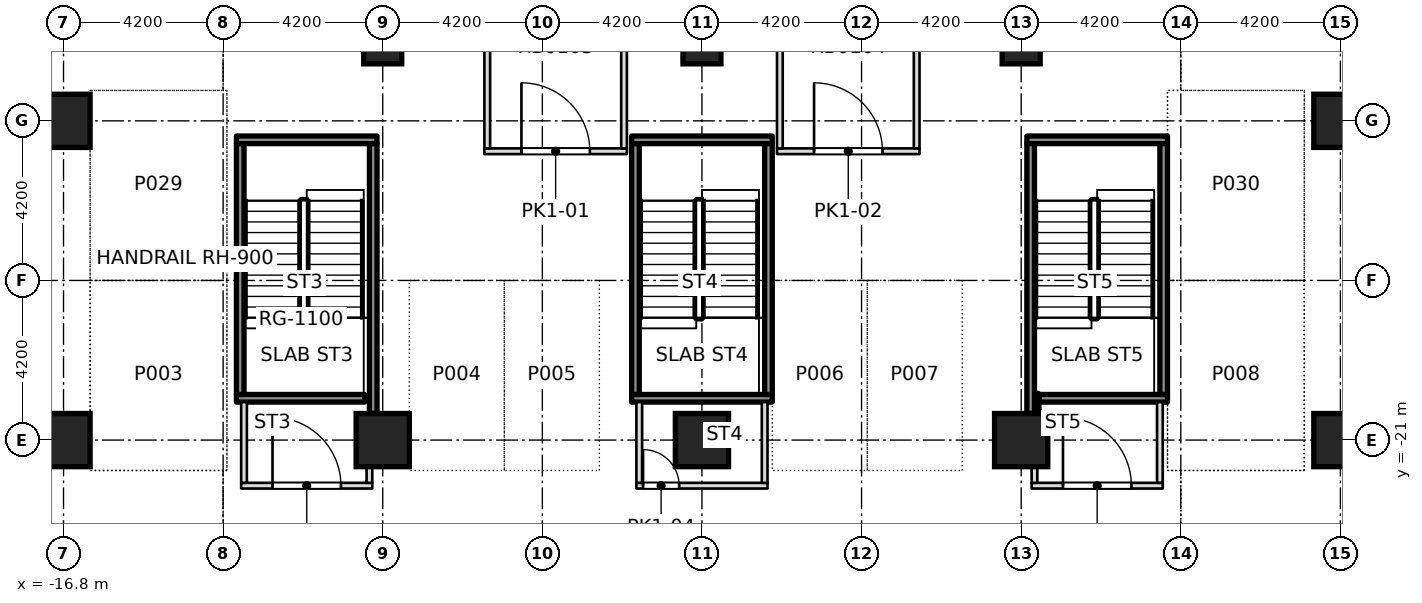
"""IFC4 building model, lengths in metres.
Left out: names, types, materials, properties, quantities, classifications, styles, units other than length and angle.
Written with IfcOpenShell. Run it as: python <this file> out.ifc"""

import sys

from ifc_helpers import new_model, si_unit, direction, frame, frame_2d, origin, origin_2d, place, context, subcontext, project, spatial, rectangle, extrude, element, fill, save


model = new_model("IFC4")
c1 = context("Model", 3, precision=1e-05, world=origin(), true_north=direction((0.0, 1.0)))
c2 = subcontext(c1, "Body", "Model", "MODEL_VIEW")
j1 = project(units=[si_unit("LENGTHUNIT", "METRE"), si_unit("PLANEANGLEUNIT", "RADIAN")], contexts=[c1])
p1 = place(None, origin())
s1 = spatial("IfcSite", under=j1, at=p1, CompositionType="ELEMENT")
p2 = place(p1, origin())
s2 = spatial("IfcBuilding", under=s1, at=p2, CompositionType="ELEMENT")
p3 = place(p2, frame((0.0, 0.0, -4.2)))
s3 = spatial("IfcBuildingStorey", under=s2, at=p3, CompositionType="ELEMENT", Elevation=-4.2)
for number, where, z_axis, x_axis in (
    (1, (-16.8, -21.0, -0.35), (0.0, 0.0, 1.0), (1.0, 0.0, 0.0)),
    (2, (-8.4, -21.0, -0.35), (0.0, 0.0, 1.0), (1.0, 0.0, 0.0)),
    (3, (0.0, -21.0, -0.35), (0.0, 0.0, 1.0), (1.0, 0.0, 0.0)),
    (4, (8.4, -21.0, -0.35), (0.0, 0.0, 1.0), (1.0, 0.0, 0.0)),
    (5, (16.8, -21.0, -0.35), (0.0, 0.0, 1.0), (1.0, 0.0, 0.0)),
    (6, (-16.8, -12.6, -0.35), (0.0, 0.0, 1.0), (1.0, 0.0, 0.0)),
    (7, (16.8, -12.6, -0.35), (0.0, 0.0, 1.0), (1.0, 0.0, 0.0)),
):
    element("IfcColumn", number, at=place(p3, frame(where, z_axis=z_axis, x_axis=x_axis)), inside=s3, PredefinedType="COLUMN", context=c2, shape_type="SweptSolid", body=[
        extrude(rectangle(XDim=1.4, YDim=1.4, at=origin_2d()), origin(), (0.0, 0.0, 1.0), 4.1),
    ])
for number, where, z_axis, x_axis in (
    (8, (-8.4, -10.6, -0.35), (0.0, 0.0, 1.0), (1.0, 0.0, 0.0)),
    (9, (0.0, -10.6, -0.35), (0.0, 0.0, 1.0), (1.0, 0.0, 0.0)),
    (10, (8.4, -10.6, -0.35), (0.0, 0.0, 1.0), (1.0, 0.0, 0.0)),
):
    element("IfcColumn", number, at=place(p3, frame(where, z_axis=z_axis, x_axis=x_axis)), inside=s3, PredefinedType="COLUMN", context=c2, shape_type="SweptSolid", body=[
        extrude(rectangle(XDim=1.0, YDim=1.0, at=origin_2d()), origin(), (0.0, 0.0, 1.0), 4.1),
    ])
p4 = place(p3, frame((-12.125, -22.2, 0.0), z_axis=(0.0, 0.0, 1.0), x_axis=(1.0, 0.0, 0.0)))
e11 = element("IfcWall", 11, at=p4, inside=s3, PredefinedType="PARTITIONING", context=c2, shape_type="SweptSolid", body=[
    extrude(rectangle(XDim=3.45, YDim=0.15, at=frame_2d((1.725, 0.0))), origin(), (0.0, 0.0, 1.0), 3.75),
])
p5 = place(p4, frame((0.825, 0.0, 0.0)))
e12 = element("IfcOpeningElement", 12, at=p5, cuts=e11, PredefinedType="OPENING", context=c2, shape_type="SweptSolid", body=[
    extrude(rectangle(XDim=1.8, YDim=2.1, at=frame_2d((0.9, 1.05))), frame((0.0, 0.085, 0.0), z_axis=(0.0, -1.0, 0.0), x_axis=(1.0, 0.0, 0.0)), (0.0, 0.0, 1.0), 0.17),
])
p6 = place(p3, frame((-1.725, -22.2, 0.0), z_axis=(0.0, 0.0, 1.0), x_axis=(1.0, 0.0, 0.0)))
e13 = element("IfcWall", 13, at=p6, inside=s3, PredefinedType="PARTITIONING", context=c2, shape_type="SweptSolid", body=[
    extrude(rectangle(XDim=3.45, YDim=0.15, at=frame_2d((1.725, 0.0))), origin(), (0.0, 0.0, 1.0), 3.75),
])
p7 = place(p6, frame((0.175, 0.0, 0.0)))
e14 = element("IfcOpeningElement", 14, at=p7, cuts=e13, PredefinedType="OPENING", context=c2, shape_type="SweptSolid", body=[
    extrude(rectangle(XDim=0.95, YDim=2.1, at=frame_2d((0.475, 1.05))), frame((0.0, 0.085, 0.0), z_axis=(0.0, -1.0, 0.0), x_axis=(1.0, 0.0, 0.0)), (0.0, 0.0, 1.0), 0.17),
])
p8 = place(p3, frame((8.675, -22.2, 0.0), z_axis=(0.0, 0.0, 1.0), x_axis=(1.0, 0.0, 0.0)))
e15 = element("IfcWall", 15, at=p8, inside=s3, PredefinedType="PARTITIONING", context=c2, shape_type="SweptSolid", body=[
    extrude(rectangle(XDim=3.45, YDim=0.15, at=frame_2d((1.725, 0.0))), origin(), (0.0, 0.0, 1.0), 3.75),
])
p9 = place(p8, frame((0.825, 0.0, 0.0)))
e16 = element("IfcOpeningElement", 16, at=p9, cuts=e15, PredefinedType="OPENING", context=c2, shape_type="SweptSolid", body=[
    extrude(rectangle(XDim=1.8, YDim=2.1, at=frame_2d((0.9, 1.05))), frame((0.0, 0.085, 0.0), z_axis=(0.0, -1.0, 0.0), x_axis=(1.0, 0.0, 0.0)), (0.0, 0.0, 1.0), 0.17),
])
p10 = place(p3, frame((-5.725, -13.4, 0.0), z_axis=(0.0, 0.0, 1.0), x_axis=(1.0, 0.0, 0.0)))
e17 = element("IfcWall", 17, at=p10, inside=s3, PredefinedType="PARTITIONING", context=c2, shape_type="SweptSolid", body=[
    extrude(rectangle(XDim=3.75, YDim=0.15, at=frame_2d((1.875, 0.0))), origin(), (0.0, 0.0, 1.0), 3.75),
])
p11 = place(p10, frame((0.975, 0.0, 0.0)))
e18 = element("IfcOpeningElement", 18, at=p11, cuts=e17, PredefinedType="OPENING", context=c2, shape_type="SweptSolid", body=[
    extrude(rectangle(XDim=1.8, YDim=2.1, at=frame_2d((0.9, 1.05))), frame((0.0, 0.085, 0.0), z_axis=(0.0, -1.0, 0.0), x_axis=(1.0, 0.0, 0.0)), (0.0, 0.0, 1.0), 0.17),
])
p12 = place(p3, frame((1.975, -13.4, 0.0), z_axis=(0.0, 0.0, 1.0), x_axis=(1.0, 0.0, 0.0)))
e19 = element("IfcWall", 19, at=p12, inside=s3, PredefinedType="PARTITIONING", context=c2, shape_type="SweptSolid", body=[
    extrude(rectangle(XDim=3.75, YDim=0.15, at=frame_2d((1.875, 0.0))), origin(), (0.0, 0.0, 1.0), 3.75),
])
p13 = place(p12, frame((0.975, 0.0, 0.0)))
e20 = element("IfcOpeningElement", 20, at=p13, cuts=e19, PredefinedType="OPENING", context=c2, shape_type="SweptSolid", body=[
    extrude(rectangle(XDim=1.8, YDim=2.1, at=frame_2d((0.9, 1.05))), frame((0.0, 0.085, 0.0), z_axis=(0.0, -1.0, 0.0), x_axis=(1.0, 0.0, 0.0)), (0.0, 0.0, 1.0), 0.17),
])
p14 = place(p3, frame((-12.05, -22.125, 0.0), z_axis=(0.0, 0.0, 1.0), x_axis=(0.0, 1.0, 0.0)))
e21 = element("IfcWall", 21, at=p14, inside=s3, PredefinedType="PARTITIONING", context=c2, shape_type="SweptSolid", body=[
    extrude(rectangle(XDim=2.125, YDim=0.15, at=frame_2d((1.062, 0.0))), origin(), (0.0, 0.0, 1.0), 3.75),
])
p15 = place(p3, frame((-8.75, -22.125, 0.0), z_axis=(0.0, 0.0, 1.0), x_axis=(0.0, 1.0, 0.0)))
e22 = element("IfcWall", 22, at=p15, inside=s3, PredefinedType="PARTITIONING", context=c2, shape_type="SweptSolid", body=[
    extrude(rectangle(XDim=0.425, YDim=0.15, at=frame_2d((0.212, 0.0))), origin(), (0.0, 0.0, 1.0), 3.75),
])
for number, where, z_axis, x_axis in (
    (23, (-5.65, -13.325, 0.0), (0.0, 0.0, 1.0), (0.0, 1.0, 0.0)),
    (24, (-2.05, -13.325, 0.0), (0.0, 0.0, 1.0), (0.0, 1.0, 0.0)),
):
    element("IfcWall", number, at=place(p3, frame(where, z_axis=z_axis, x_axis=x_axis)), inside=s3, PredefinedType="PARTITIONING", context=c2, shape_type="SweptSolid", body=[
        extrude(rectangle(XDim=4.924, YDim=0.15, at=frame_2d((2.462, 0.0))), origin(), (0.0, 0.0, 1.0), 3.75),
    ])
for number, where, z_axis, x_axis in (
    (25, (-1.65, -22.125, 0.0), (0.0, 0.0, 1.0), (0.0, 1.0, 0.0)),
    (26, (1.65, -22.125, 0.0), (0.0, 0.0, 1.0), (0.0, 1.0, 0.0)),
):
    element("IfcWall", number, at=place(p3, frame(where, z_axis=z_axis, x_axis=x_axis)), inside=s3, PredefinedType="PARTITIONING", context=c2, shape_type="SweptSolid", body=[
        extrude(rectangle(XDim=2.125, YDim=0.15, at=frame_2d((1.062, 0.0))), origin(), (0.0, 0.0, 1.0), 3.75),
    ])
for number, where, z_axis, x_axis in (
    (27, (2.05, -13.325, 0.0), (0.0, 0.0, 1.0), (0.0, 1.0, 0.0)),
    (28, (5.65, -13.325, 0.0), (0.0, 0.0, 1.0), (0.0, 1.0, 0.0)),
):
    element("IfcWall", number, at=place(p3, frame(where, z_axis=z_axis, x_axis=x_axis)), inside=s3, PredefinedType="PARTITIONING", context=c2, shape_type="SweptSolid", body=[
        extrude(rectangle(XDim=4.924, YDim=0.15, at=frame_2d((2.462, 0.0))), origin(), (0.0, 0.0, 1.0), 3.75),
    ])
p16 = place(p3, frame((8.75, -22.125, 0.0), z_axis=(0.0, 0.0, 1.0), x_axis=(0.0, 1.0, 0.0)))
e29 = element("IfcWall", 29, at=p16, inside=s3, PredefinedType="PARTITIONING", context=c2, shape_type="SweptSolid", body=[
    extrude(rectangle(XDim=0.425, YDim=0.15, at=frame_2d((0.212, 0.0))), origin(), (0.0, 0.0, 1.0), 3.75),
])
p17 = place(p3, frame((8.775, -20.3, 0.0), z_axis=(0.0, 0.0, 1.0), x_axis=(-0.047388561008, 0.998876531052, 0.0)))
e30 = element("IfcWall", 30, at=p17, inside=s3, PredefinedType="SOLIDWALL", context=c2, shape_type="SweptSolid", body=[
    extrude(rectangle(XDim=0.525, YDim=0.2, at=frame_2d((0.263, 0.0))), origin(), (0.0, 0.0, 1.0), 3.75),
])
p18 = place(p3, frame((12.05, -22.125, 0.0), z_axis=(0.0, 0.0, 1.0), x_axis=(0.0, 1.0, 0.0)))
e31 = element("IfcWall", 31, at=p18, inside=s3, PredefinedType="PARTITIONING", context=c2, shape_type="SweptSolid", body=[
    extrude(rectangle(XDim=2.125, YDim=0.15, at=frame_2d((1.062, 0.0))), origin(), (0.0, 0.0, 1.0), 3.75),
])
p19 = place(p3, frame((-12.25, -19.9, 0.0), z_axis=(0.0, 0.0, 1.0), x_axis=(1.0, 0.0, 0.0)))
e32 = element("IfcWall", 32, at=p19, inside=s3, PredefinedType="SOLIDWALL", context=c2, shape_type="SweptSolid", body=[
    extrude(rectangle(XDim=3.375, YDim=0.2, at=frame_2d((1.688, 0.0))), origin(), (0.0, 0.0, 1.0), 3.75),
])
p20 = place(p3, frame((-12.25, -13.1, 0.0), z_axis=(0.0, 0.0, 1.0), x_axis=(1.0, 0.0, 0.0)))
e33 = element("IfcWall", 33, at=p20, inside=s3, PredefinedType="SOLIDWALL", context=c2, shape_type="SweptSolid", body=[
    extrude(rectangle(XDim=3.7, YDim=0.2, at=frame_2d((1.85, 0.0))), origin(), (0.0, 0.0, 1.0), 3.75),
])
p21 = place(p3, frame((-12.15, -19.8, 0.0), z_axis=(0.0, 0.0, 1.0), x_axis=(0.0, 1.0, 0.0)))
e34 = element("IfcWall", 34, at=p21, inside=s3, PredefinedType="SOLIDWALL", context=c2, shape_type="SweptSolid", body=[
    extrude(rectangle(XDim=6.6, YDim=0.2, at=frame_2d((3.3, 0.0))), origin(), (0.0, 0.0, 1.0), 3.75),
])
p22 = place(p3, frame((-8.65, -20.3, 0.0), z_axis=(0.0, 0.0, 1.0), x_axis=(0.0, 1.0, 0.0)))
e35 = element("IfcWall", 35, at=p22, inside=s3, PredefinedType="SOLIDWALL", context=c2, shape_type="SweptSolid", body=[
    extrude(rectangle(XDim=7.1, YDim=0.2, at=frame_2d((3.55, 0.0))), origin(), (0.0, 0.0, 1.0), 3.75),
])
for number, where, z_axis, x_axis in (
    (36, (-1.85, -19.9, 0.0), (0.0, 0.0, 1.0), (1.0, 0.0, 0.0)),
    (37, (-1.85, -13.1, 0.0), (0.0, 0.0, 1.0), (1.0, 0.0, 0.0)),
):
    element("IfcWall", number, at=place(p3, frame(where, z_axis=z_axis, x_axis=x_axis)), inside=s3, PredefinedType="SOLIDWALL", context=c2, shape_type="SweptSolid", body=[
        extrude(rectangle(XDim=3.7, YDim=0.2, at=frame_2d((1.85, 0.0))), origin(), (0.0, 0.0, 1.0), 3.75),
    ])
for number, where, z_axis, x_axis in (
    (38, (-1.75, -19.8, 0.0), (0.0, 0.0, 1.0), (0.0, 1.0, 0.0)),
    (39, (1.75, -19.8, 0.0), (0.0, 0.0, 1.0), (0.0, 1.0, 0.0)),
):
    element("IfcWall", number, at=place(p3, frame(where, z_axis=z_axis, x_axis=x_axis)), inside=s3, PredefinedType="SOLIDWALL", context=c2, shape_type="SweptSolid", body=[
        extrude(rectangle(XDim=6.6, YDim=0.2, at=frame_2d((3.3, 0.0))), origin(), (0.0, 0.0, 1.0), 3.75),
    ])
p23 = place(p3, frame((8.875, -19.9, 0.0), z_axis=(0.0, 0.0, 1.0), x_axis=(1.0, 0.0, 0.0)))
e40 = element("IfcWall", 40, at=p23, inside=s3, PredefinedType="SOLIDWALL", context=c2, shape_type="SweptSolid", body=[
    extrude(rectangle(XDim=3.375, YDim=0.2, at=frame_2d((1.688, 0.0))), origin(), (0.0, 0.0, 1.0), 3.75),
])
p24 = place(p3, frame((8.55, -13.1, 0.0), z_axis=(0.0, 0.0, 1.0), x_axis=(1.0, 0.0, 0.0)))
e41 = element("IfcWall", 41, at=p24, inside=s3, PredefinedType="SOLIDWALL", context=c2, shape_type="SweptSolid", body=[
    extrude(rectangle(XDim=3.7, YDim=0.2, at=frame_2d((1.85, 0.0))), origin(), (0.0, 0.0, 1.0), 3.75),
])
p25 = place(p3, frame((8.65, -20.3, 0.0), z_axis=(0.0, 0.0, 1.0), x_axis=(0.0, 1.0, 0.0)))
e42 = element("IfcWall", 42, at=p25, inside=s3, PredefinedType="SOLIDWALL", context=c2, shape_type="SweptSolid", body=[
    extrude(rectangle(XDim=7.1, YDim=0.2, at=frame_2d((3.55, 0.0))), origin(), (0.0, 0.0, 1.0), 3.75),
])
p26 = place(p3, frame((12.15, -19.8, 0.0), z_axis=(0.0, 0.0, 1.0), x_axis=(0.0, 1.0, 0.0)))
e43 = element("IfcWall", 43, at=p26, inside=s3, PredefinedType="SOLIDWALL", context=c2, shape_type="SweptSolid", body=[
    extrude(rectangle(XDim=6.6, YDim=0.2, at=frame_2d((3.3, 0.0))), origin(), (0.0, 0.0, 1.0), 3.75),
])
p27 = place(p11, origin())
e44 = element("IfcDoor", 44, at=p27, inside=s3, OperationType="DOUBLE_DOOR_SINGLE_SWING", PredefinedType="DOOR", context=c2, shape_type="SweptSolid", body=[
    extrude(rectangle(XDim=1.8, YDim=2.1, at=frame_2d((0.9, 1.05))), frame((0.0, 0.025, 0.0), z_axis=(0.0, -1.0, 0.0), x_axis=(1.0, 0.0, 0.0)), (0.0, 0.0, 1.0), 0.05),
])
fill(e18, e44)
p28 = place(p13, origin())
e45 = element("IfcDoor", 45, at=p28, inside=s3, OperationType="DOUBLE_DOOR_SINGLE_SWING", PredefinedType="DOOR", context=c2, shape_type="SweptSolid", body=[
    extrude(rectangle(XDim=1.8, YDim=2.1, at=frame_2d((0.9, 1.05))), frame((0.0, 0.025, 0.0), z_axis=(0.0, -1.0, 0.0), x_axis=(1.0, 0.0, 0.0)), (0.0, 0.0, 1.0), 0.05),
])
fill(e20, e45)
p29 = place(p5, origin())
e46 = element("IfcDoor", 46, at=p29, inside=s3, OperationType="DOUBLE_DOOR_SINGLE_SWING", PredefinedType="DOOR", context=c2, shape_type="SweptSolid", body=[
    extrude(rectangle(XDim=1.8, YDim=2.1, at=frame_2d((0.9, 1.05))), frame((0.0, 0.025, 0.0), z_axis=(0.0, -1.0, 0.0), x_axis=(1.0, 0.0, 0.0)), (0.0, 0.0, 1.0), 0.05),
])
fill(e12, e46)
p30 = place(p7, origin())
e47 = element("IfcDoor", 47, at=p30, inside=s3, OperationType="SINGLE_SWING_LEFT", PredefinedType="DOOR", context=c2, shape_type="SweptSolid", body=[
    extrude(rectangle(XDim=0.95, YDim=2.1, at=frame_2d((0.475, 1.05))), frame((0.0, 0.025, 0.0), z_axis=(0.0, -1.0, 0.0), x_axis=(1.0, 0.0, 0.0)), (0.0, 0.0, 1.0), 0.05),
])
fill(e14, e47)
p31 = place(p9, origin())
e48 = element("IfcDoor", 48, at=p31, inside=s3, OperationType="DOUBLE_DOOR_SINGLE_SWING", PredefinedType="DOOR", context=c2, shape_type="SweptSolid", body=[
    extrude(rectangle(XDim=1.8, YDim=2.1, at=frame_2d((0.9, 1.05))), frame((0.0, 0.025, 0.0), z_axis=(0.0, -1.0, 0.0), x_axis=(1.0, 0.0, 0.0)), (0.0, 0.0, 1.0), 0.05),
])
fill(e16, e48)
save(model, sys.argv[1])
